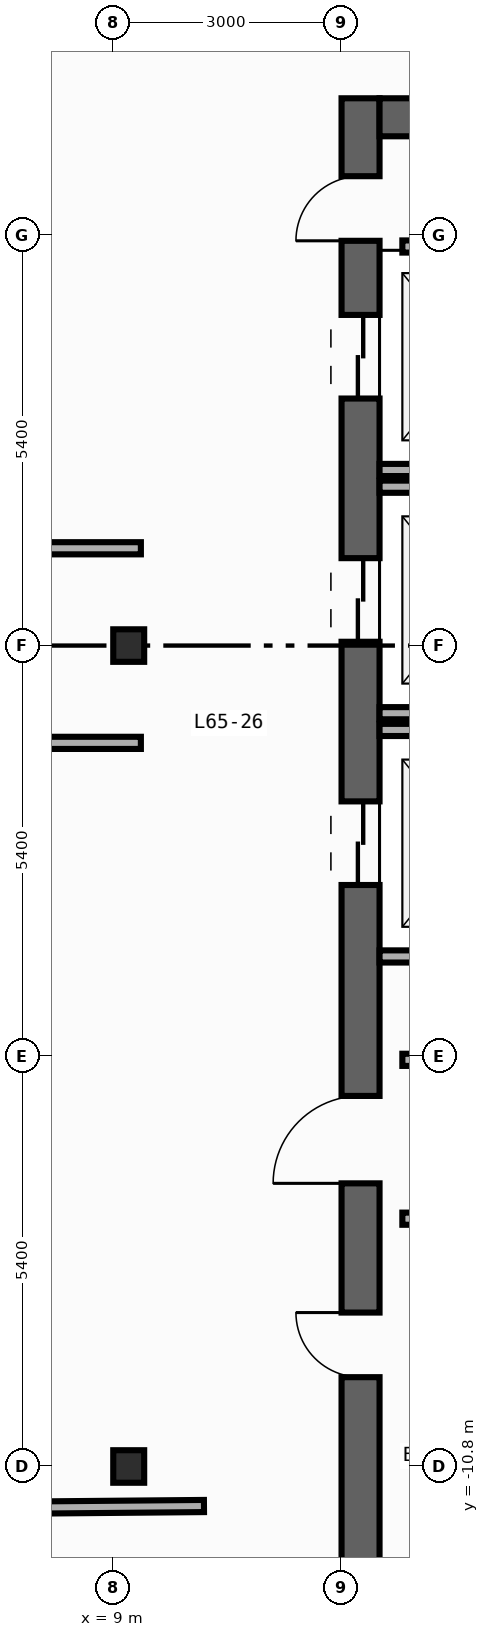
"""IFC4 building model, lengths in metres.
Left out: names, types, materials, properties, quantities, classifications, styles, units other than length and angle.
Written with IfcOpenShell. Run it as: python <this file> out.ifc"""

import sys

from ifc_helpers import new_model, si_unit, direction, frame, frame_2d, origin, origin_2d, place, context, subcontext, project, spatial, rectangle, i_section, extrude, element, fill, save


model = new_model("IFC4")
c1 = context("Model", 3, precision=1e-05, world=origin(), true_north=direction((0.0, 1.0)))
c2 = subcontext(c1, "Body", "Model", "MODEL_VIEW")
j1 = project(units=[si_unit("LENGTHUNIT", "METRE"), si_unit("PLANEANGLEUNIT", "RADIAN")], contexts=[c1])
p1 = place(None, origin())
s1 = spatial("IfcSite", under=j1, at=p1, CompositionType="ELEMENT")
p2 = place(p1, origin())
s2 = spatial("IfcBuilding", under=s1, at=p2, CompositionType="ELEMENT")
p3 = place(p2, frame((0.0, 0.0, 272.8)))
s3 = spatial("IfcBuildingStorey", under=s2, at=p3, CompositionType="ELEMENT", Elevation=272.8)
p4 = place(p3, frame((12.25, -19.8, 0.0), z_axis=(0.0, 0.0, 1.0), x_axis=(0.0, 1.0, 0.0)))
e1 = element("IfcWall", 1, at=p4, inside=s3, PredefinedType="SHEAR", context=c2, shape_type="SweptSolid", body=[
    extrude(rectangle(XDim=27.0, YDim=0.5, at=frame_2d((13.5, 0.0))), origin(), (0.0, 0.0, 1.0), 4.54),
])
p5 = place(p4, frame((23.05, 0.0, 0.0)))
e2 = element("IfcOpeningElement", 2, at=p5, cuts=e1, PredefinedType="OPENING", context=c2, shape_type="SweptSolid", body=[
    extrude(rectangle(XDim=1.1, YDim=2.2, at=frame_2d((0.55, 1.1))), frame((0.0, 0.26, 0.0), z_axis=(0.0, -1.0, 0.0), x_axis=(1.0, 0.0, 0.0)), (0.0, 0.0, 1.0), 0.52),
])
p6 = place(p4, frame((19.85, 0.0, 0.0)))
e3 = element("IfcOpeningElement", 3, at=p6, cuts=e1, PredefinedType="OPENING", context=c2, shape_type="SweptSolid", body=[
    extrude(rectangle(XDim=1.1, YDim=2.2, at=frame_2d((0.55, 1.1))), frame((0.0, 0.26, 0.0), z_axis=(0.0, -1.0, 0.0), x_axis=(1.0, 0.0, 0.0)), (0.0, 0.0, 1.0), 0.52),
])
p7 = place(p4, frame((16.65, 0.0, 0.0)))
e4 = element("IfcOpeningElement", 4, at=p7, cuts=e1, PredefinedType="OPENING", context=c2, shape_type="SweptSolid", body=[
    extrude(rectangle(XDim=1.1, YDim=2.2, at=frame_2d((0.55, 1.1))), frame((0.0, 0.26, 0.0), z_axis=(0.0, -1.0, 0.0), x_axis=(1.0, 0.0, 0.0)), (0.0, 0.0, 1.0), 0.52),
])
p8 = place(p4, frame((10.175, 0.0, 0.0)))
e5 = element("IfcOpeningElement", 5, at=p8, cuts=e1, PredefinedType="OPENING", context=c2, shape_type="SweptSolid", body=[
    extrude(rectangle(XDim=0.85, YDim=2.1, at=frame_2d((0.425, 1.05))), frame((0.0, 0.26, 0.0), z_axis=(0.0, -1.0, 0.0), x_axis=(1.0, 0.0, 0.0)), (0.0, 0.0, 1.0), 0.52),
])
p9 = place(p4, frame((12.725, 0.0, 0.0)))
e6 = element("IfcOpeningElement", 6, at=p9, cuts=e1, PredefinedType="OPENING", context=c2, shape_type="SweptSolid", body=[
    extrude(rectangle(XDim=1.15, YDim=2.2, at=frame_2d((0.575, 1.1))), frame((0.0, 0.26, 0.0), z_axis=(0.0, -1.0, 0.0), x_axis=(1.0, 0.0, 0.0)), (0.0, 0.0, 1.0), 0.52),
])
p10 = place(p4, frame((25.125, 0.0, 0.0)))
e7 = element("IfcOpeningElement", 7, at=p10, cuts=e1, PredefinedType="OPENING", context=c2, shape_type="SweptSolid", body=[
    extrude(rectangle(XDim=0.85, YDim=2.1, at=frame_2d((0.425, 1.05))), frame((0.0, 0.26, 0.0), z_axis=(0.0, -1.0, 0.0), x_axis=(1.0, 0.0, 0.0)), (0.0, 0.0, 1.0), 0.52),
])
p11 = place(p3, frame((12.5, 6.95, 0.0), z_axis=(0.0, 0.0, 1.0), x_axis=(1.0, 0.0, 0.0)))
e8 = element("IfcWall", 8, at=p11, inside=s3, PredefinedType="SHEAR", context=c2, shape_type="SweptSolid", body=[
    extrude(rectangle(XDim=7.4, YDim=0.5, at=frame_2d((3.7, 0.0))), origin(), (0.0, 0.0, 1.0), 4.54),
])
for number, where, z_axis, x_axis in (
    (9, (9.2, -10.8, 0.0), (0.0, 0.0, 1.0), (1.0, 0.0, 0.0)),
    (10, (9.2, 0.0, 0.0), (0.0, 0.0, 1.0), (1.0, 0.0, 0.0)),
):
    element("IfcColumn", number, at=place(p3, frame(where, z_axis=z_axis, x_axis=x_axis)), inside=s3, PredefinedType="COLUMN", context=c2, shape_type="SweptSolid", body=[
        extrude(i_section(OverallWidth=0.407, OverallDepth=0.428, WebThickness=0.02, FlangeThickness=0.035, FilletRadius=0.022, at=origin_2d()), origin(), (0.0, 0.0, 1.0), 4.8),
    ])
for number, where, z_axis, x_axis in (
    (11, (12.5, 2.31, 0.0), (0.0, 0.0, 1.0), (1.0, 0.0, 0.0)),
    (12, (12.5, -0.89, 0.0), (0.0, 0.0, 1.0), (1.0, 0.0, 0.0)),
    (13, (12.5, 2.09, 0.0), (0.0, 0.0, 1.0), (1.0, 0.0, 0.0)),
    (14, (12.5, -4.09, 0.0), (0.0, 0.0, 1.0), (1.0, 0.0, 0.0)),
    (15, (12.5, -1.11, 0.0), (0.0, 0.0, 1.0), (1.0, 0.0, 0.0)),
):
    element("IfcWall", number, at=place(p3, frame(where, z_axis=z_axis, x_axis=x_axis)), inside=s3, PredefinedType="STANDARD", context=c2, shape_type="SweptSolid", body=[
        extrude(rectangle(XDim=2.49, YDim=0.16, at=frame_2d((1.245, 0.0))), origin(), (0.0, 0.0, 1.0), 4.54),
    ])
for number, where, z_axis, x_axis in (
    (16, (12.8, -5.45, 0.0), (0.0, 0.0, 1.0), (1.0, 0.0, 0.0)),
    (17, (12.8, -7.54, 0.0), (0.0, 0.0, 1.0), (1.0, 0.0, 0.0)),
    (18, (12.8, 5.25, 0.0), (0.0, 0.0, 1.0), (1.0, 0.0, 0.0)),
):
    element("IfcWall", number, at=place(p3, frame(where, z_axis=z_axis, x_axis=x_axis)), inside=s3, PredefinedType="STANDARD", context=c2, shape_type="SweptSolid", body=[
        extrude(rectangle(XDim=2.6, YDim=0.16, at=frame_2d((1.3, 0.0))), origin(), (0.0, 0.0, 1.0), 4.54),
    ])
p12 = place(p3, frame((1.12, 1.28, 0.0), z_axis=(0.0, 0.0, 1.0), x_axis=(1.0, 0.0, 0.0)))
e19 = element("IfcWall", 19, at=p12, inside=s3, PredefinedType="PARTITIONING", context=c2, shape_type="SweptSolid", body=[
    extrude(rectangle(XDim=8.24, YDim=0.16, at=frame_2d((4.12, 0.0))), origin(), (0.0, 0.0, 1.0), 4.54),
])
p13 = place(p12, frame((0.46, 0.0, 0.0)))
e20 = element("IfcOpeningElement", 20, at=p13, cuts=e19, PredefinedType="OPENING", context=c2, shape_type="SweptSolid", body=[
    extrude(rectangle(XDim=0.9, YDim=2.15, at=frame_2d((0.45, 1.075))), frame((0.0, 0.09, 0.0), z_axis=(0.0, -1.0, 0.0), x_axis=(1.0, 0.0, 0.0)), (0.0, 0.0, 1.0), 0.18),
])
p14 = place(p3, frame((1.2, -1.28, 0.0), z_axis=(0.0, 0.0, 1.0), x_axis=(1.0, 0.0, 0.0)))
e21 = element("IfcWall", 21, at=p14, inside=s3, PredefinedType="PARTITIONING", context=c2, shape_type="SweptSolid", body=[
    extrude(rectangle(XDim=8.16, YDim=0.16, at=frame_2d((4.08, 0.0))), origin(), (0.0, 0.0, 1.0), 4.54),
])
p15 = place(p14, frame((0.46, 0.0, 0.0)))
e22 = element("IfcOpeningElement", 22, at=p15, cuts=e21, PredefinedType="OPENING", context=c2, shape_type="SweptSolid", body=[
    extrude(rectangle(XDim=0.9, YDim=2.15, at=frame_2d((0.45, 1.075))), frame((0.0, 0.09, 0.0), z_axis=(0.0, -1.0, 0.0), x_axis=(1.0, 0.0, 0.0)), (0.0, 0.0, 1.0), 0.18),
])
p16 = place(p3, frame((1.28, -11.4, 0.0), z_axis=(0.0, 0.0, 1.0), x_axis=(0.999959860438, 0.008959771869, 0.0)))
e23 = element("IfcWall", 23, at=p16, inside=s3, PredefinedType="PARTITIONING", context=c2, shape_type="SweptSolid", body=[
    extrude(rectangle(XDim=8.91, YDim=0.16, at=frame_2d((4.455, 0.0))), origin(), (0.0, 0.0, 1.0), 4.54),
])
p17 = place(p5, origin())
e24 = element("IfcDoor", 24, at=p17, inside=s3, OperationType="DOUBLE_DOOR_SLIDING", PredefinedType="DOOR", context=c2, shape_type="SweptSolid", body=[
    extrude(rectangle(XDim=1.1, YDim=2.2, at=frame_2d((0.55, 1.1))), frame((0.0, 0.025, 0.0), z_axis=(0.0, -1.0, 0.0), x_axis=(1.0, 0.0, 0.0)), (0.0, 0.0, 1.0), 0.05),
])
fill(e2, e24)
p18 = place(p6, origin())
e25 = element("IfcDoor", 25, at=p18, inside=s3, OperationType="DOUBLE_DOOR_SLIDING", PredefinedType="DOOR", context=c2, shape_type="SweptSolid", body=[
    extrude(rectangle(XDim=1.1, YDim=2.2, at=frame_2d((0.55, 1.1))), frame((0.0, 0.025, 0.0), z_axis=(0.0, -1.0, 0.0), x_axis=(1.0, 0.0, 0.0)), (0.0, 0.0, 1.0), 0.05),
])
fill(e3, e25)
p19 = place(p7, origin())
e26 = element("IfcDoor", 26, at=p19, inside=s3, OperationType="DOUBLE_DOOR_SLIDING", PredefinedType="DOOR", context=c2, shape_type="SweptSolid", body=[
    extrude(rectangle(XDim=1.1, YDim=2.2, at=frame_2d((0.55, 1.1))), frame((0.0, 0.025, 0.0), z_axis=(0.0, -1.0, 0.0), x_axis=(1.0, 0.0, 0.0)), (0.0, 0.0, 1.0), 0.05),
])
fill(e4, e26)
p20 = place(p8, origin())
e27 = element("IfcDoor", 27, at=p20, inside=s3, OperationType="SINGLE_SWING_RIGHT", PredefinedType="DOOR", context=c2, shape_type="SweptSolid", body=[
    extrude(rectangle(XDim=0.85, YDim=2.1, at=frame_2d((0.425, 1.05))), frame((0.0, 0.025, 0.0), z_axis=(0.0, -1.0, 0.0), x_axis=(1.0, 0.0, 0.0)), (0.0, 0.0, 1.0), 0.05),
])
fill(e5, e27)
p21 = place(p9, origin())
e28 = element("IfcDoor", 28, at=p21, inside=s3, OperationType="SINGLE_SWING_LEFT", PredefinedType="DOOR", context=c2, shape_type="SweptSolid", body=[
    extrude(rectangle(XDim=1.15, YDim=2.2, at=frame_2d((0.575, 1.1))), frame((0.0, 0.025, 0.0), z_axis=(0.0, -1.0, 0.0), x_axis=(1.0, 0.0, 0.0)), (0.0, 0.0, 1.0), 0.05),
])
fill(e6, e28)
p22 = place(p10, origin())
e29 = element("IfcDoor", 29, at=p22, inside=s3, OperationType="SINGLE_SWING_LEFT", PredefinedType="DOOR", context=c2, shape_type="SweptSolid", body=[
    extrude(rectangle(XDim=0.85, YDim=2.1, at=frame_2d((0.425, 1.05))), frame((0.0, 0.025, 0.0), z_axis=(0.0, -1.0, 0.0), x_axis=(1.0, 0.0, 0.0)), (0.0, 0.0, 1.0), 0.05),
])
fill(e7, e29)
save(model, sys.argv[1])
